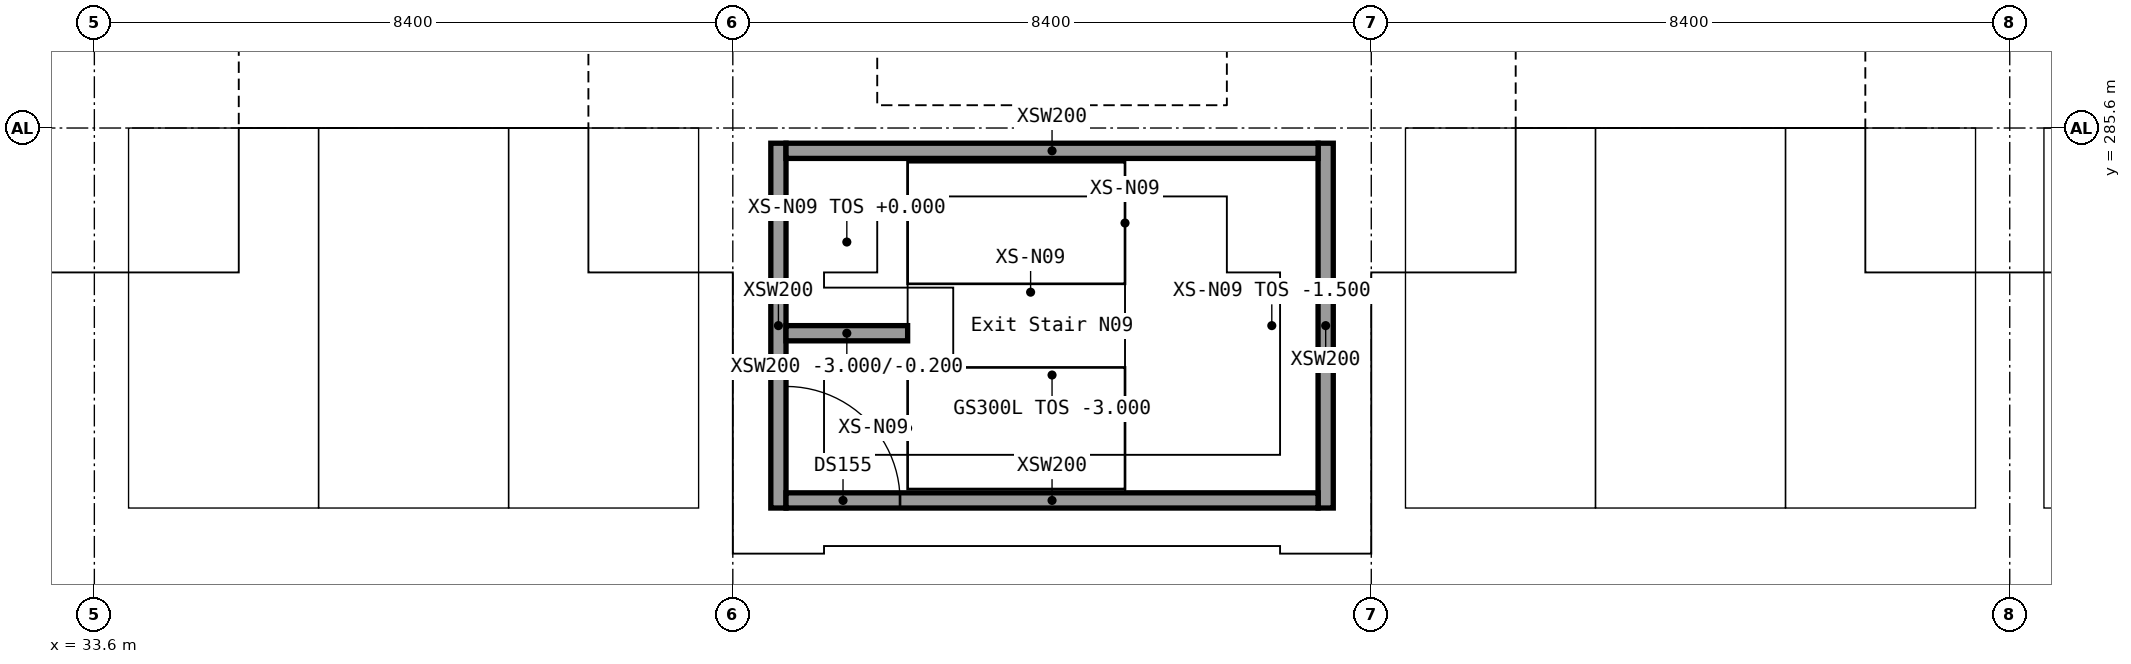
"""IFC4 building model, lengths in metres.
Left out: names, types, materials, properties, quantities, classifications, styles, units other than length and angle.
Written with IfcOpenShell. Run it as: python <this file> out.ifc"""

import sys

from ifc_helpers import new_model, si_unit, direction, frame, frame_2d, origin, origin_2d, place, context, subcontext, project, spatial, rectangle, extrude, element, fill, save


model = new_model("IFC4")
c1 = context("Model", 3, precision=1e-05, world=origin(), true_north=direction((0.0, 1.0)))
c2 = subcontext(c1, "Body", "Model", "MODEL_VIEW")
j1 = project(units=[si_unit("LENGTHUNIT", "METRE"), si_unit("PLANEANGLEUNIT", "RADIAN")], contexts=[c1])
p1 = place(None, origin())
s1 = spatial("IfcSite", under=j1, at=p1, CompositionType="ELEMENT")
p2 = place(p1, origin())
s2 = spatial("IfcBuilding", under=s1, at=p2, CompositionType="ELEMENT")
p3 = place(p2, frame((0.0, 0.0, -3.0)))
s3 = spatial("IfcBuildingStorey", under=s2, at=p3, CompositionType="ELEMENT", Elevation=-3.0)
for number, where, z_axis, x_axis in (
    (1, (42.6, 280.6, 0.0), (0.0, 0.0, 1.0), (0.0, 1.0, 0.0)),
    (2, (49.8, 280.6, 0.0), (0.0, 0.0, 1.0), (0.0, 1.0, 0.0)),
):
    element("IfcWall", number, at=place(p3, frame(where, z_axis=z_axis, x_axis=x_axis)), inside=s3, PredefinedType="SOLIDWALL", context=c2, shape_type="SweptSolid", body=[
        extrude(rectangle(XDim=4.8, YDim=0.2, at=frame_2d((2.4, 0.0))), origin(), (0.0, 0.0, 1.0), 3.0),
    ])
p4 = place(p3, frame((42.7, 280.7, 0.0), z_axis=(0.0, 0.0, 1.0), x_axis=(1.0, 0.0, 0.0)))
e3 = element("IfcWall", 3, at=p4, inside=s3, PredefinedType="SOLIDWALL", context=c2, shape_type="SweptSolid", body=[
    extrude(rectangle(XDim=7.0, YDim=0.2, at=frame_2d((3.5, 0.0))), origin(), (0.0, 0.0, 1.0), 3.0),
])
p5 = place(p4, origin())
e4 = element("IfcOpeningElement", 4, at=p5, cuts=e3, PredefinedType="OPENING", context=c2, shape_type="SweptSolid", body=[
    extrude(rectangle(XDim=1.5, YDim=2.1, at=frame_2d((0.75, 1.05))), frame((0.0, 0.1, 0.0), z_axis=(0.0, -1.0, 0.0), x_axis=(1.0, 0.0, 0.0)), (0.0, 0.0, 1.0), 0.2),
])
p6 = place(p3, frame((42.7, 285.3, 0.0), z_axis=(0.0, 0.0, 1.0), x_axis=(1.0, 0.0, 0.0)))
e5 = element("IfcWall", 5, at=p6, inside=s3, PredefinedType="SOLIDWALL", context=c2, shape_type="SweptSolid", body=[
    extrude(rectangle(XDim=7.0, YDim=0.2, at=frame_2d((3.5, 0.0))), origin(), (0.0, 0.0, 1.0), 3.0),
])
p7 = place(p3, frame((42.7, 282.9, 0.0), z_axis=(0.0, 0.0, 1.0), x_axis=(1.0, 0.0, 0.0)))
e6 = element("IfcWall", 6, at=p7, inside=s3, PredefinedType="SOLIDWALL", context=c2, shape_type="SweptSolid", body=[
    extrude(rectangle(XDim=1.6, YDim=0.2, at=frame_2d((0.8, 0.0))), origin(), (0.0, 0.0, 1.0), 2.8),
])
for number, where, z_axis, x_axis in (
    (7, (33.6, 285.6, 0.0), (0.0, 0.0, 1.0), (1.0, 0.0, 0.0)),
    (8, (42.0, 285.6, 0.0), (0.0, 0.0, 1.0), (1.0, 0.0, 0.0)),
    (9, (50.4, 285.6, 0.0), (0.0, 0.0, 1.0), (1.0, 0.0, 0.0)),
    (10, (58.8, 285.6, 0.0), (0.0, 0.0, 1.0), (1.0, 0.0, 0.0)),
):
    element("IfcColumn", number, at=place(p3, frame(where, z_axis=z_axis, x_axis=x_axis)), inside=s3, PredefinedType="COLUMN", context=c2, shape_type="SweptSolid", body=[
        extrude(rectangle(XDim=0.8, YDim=0.8, at=origin_2d()), origin(), (0.0, 0.0, 1.0), 2.4),
    ])
p8 = place(p5, origin())
e11 = element("IfcDoor", 11, at=p8, inside=s3, OperationType="SINGLE_SWING_LEFT", PredefinedType="DOOR", context=c2, shape_type="SweptSolid", body=[
    extrude(rectangle(XDim=1.5, YDim=2.1, at=frame_2d((0.75, 1.05))), frame((0.0, 0.025, 0.0), z_axis=(0.0, -1.0, 0.0), x_axis=(1.0, 0.0, 0.0)), (0.0, 0.0, 1.0), 0.05),
])
fill(e4, e11)
save(model, sys.argv[1])
